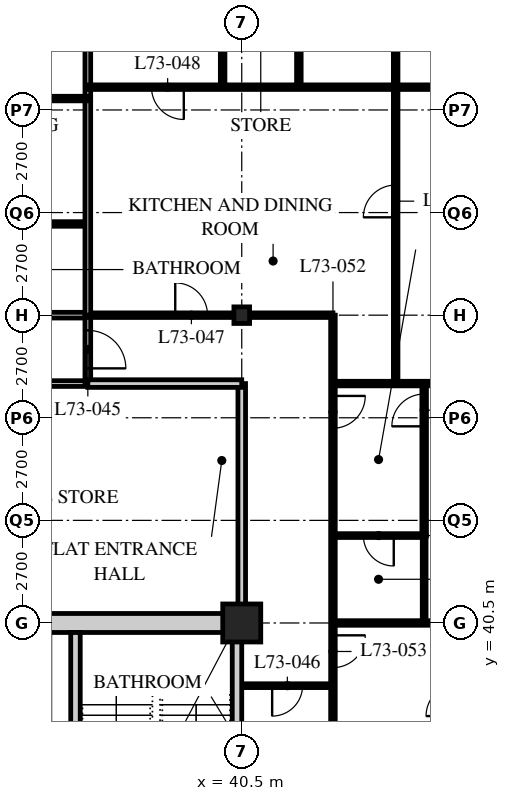
"""IFC4 building model, lengths in metres.
Left out: names, types, materials, properties, quantities, classifications, styles, units other than length and angle.
Written with IfcOpenShell. Run it as: python <this file> out.ifc"""

import sys

from ifc_helpers import new_model, si_unit, direction, frame, frame_2d, origin, origin_2d, place, context, subcontext, project, spatial, rectangle, hollow_rectangle, i_section, extrude, element, fill, save


model = new_model("IFC4")
c1 = context("Model", 3, precision=1e-05, world=origin(), true_north=direction((0.0, 1.0)))
c2 = subcontext(c1, "Body", "Model", "MODEL_VIEW")
j1 = project(units=[si_unit("LENGTHUNIT", "METRE"), si_unit("PLANEANGLEUNIT", "RADIAN")], contexts=[c1])
p1 = place(None, origin())
s1 = spatial("IfcSite", under=j1, at=p1, CompositionType="ELEMENT")
p2 = place(p1, origin())
s2 = spatial("IfcBuilding", under=s1, at=p2, CompositionType="ELEMENT")
p3 = place(p2, frame((0.0, 0.0, 285.3)))
s3 = spatial("IfcBuildingStorey", under=s2, at=p3, CompositionType="ELEMENT", Elevation=285.3)
p4 = place(p3, frame((40.5, 40.5, 0.0), z_axis=(0.0, 0.0, 1.0), x_axis=(1.0, 0.0, 0.0)))
e1 = element("IfcColumn", 1, at=p4, inside=s3, PredefinedType="COLUMN", context=c2, shape_type="SweptSolid", body=[
    extrude(hollow_rectangle(XDim=1.0, YDim=1.0, WallThickness=0.1, at=origin_2d()), origin(), (0.0, 0.0, 1.0), 3.9),
])
p5 = place(p3, frame((40.5, 48.6, 0.0), z_axis=(0.0, 0.0, 1.0), x_axis=(1.0, 0.0, 0.0)))
e2 = element("IfcColumn", 2, at=p5, inside=s3, PredefinedType="COLUMN", context=c2, shape_type="SweptSolid", body=[
    extrude(i_section(OverallWidth=0.412, OverallDepth=0.437, WebThickness=0.036, FlangeThickness=0.058, FilletRadius=0.015, at=origin_2d()), origin(), (0.0, 0.0, 1.0), 3.9),
])
p6 = place(p3, frame((12.15, 48.6, 0.0), z_axis=(0.0, 0.0, 1.0), x_axis=(1.0, 0.0, 0.0)))
e3 = element("IfcWall", 3, at=p6, inside=s3, PredefinedType="PARTITIONING", context=c2, shape_type="SweptSolid", body=[
    extrude(rectangle(XDim=24.3, YDim=0.15, at=frame_2d((12.15, 0.0))), origin(), (0.0, 0.0, 1.0), 3.078),
])
p7 = place(p6, frame((4.95, 0.0, 0.0)))
e4 = element("IfcOpeningElement", 4, at=p7, cuts=e3, PredefinedType="OPENING", context=c2, shape_type="SweptSolid", body=[
    extrude(rectangle(XDim=1.0, YDim=2.1, at=frame_2d((0.5, 1.05))), frame((0.0, 0.085, 0.0), z_axis=(0.0, -1.0, 0.0), x_axis=(1.0, 0.0, 0.0)), (0.0, 0.0, 1.0), 0.17),
])
p8 = place(p6, frame((16.6, 0.0, 0.0)))
e5 = element("IfcOpeningElement", 5, at=p8, cuts=e3, PredefinedType="OPENING", context=c2, shape_type="SweptSolid", body=[
    extrude(rectangle(XDim=1.0, YDim=2.1, at=frame_2d((0.5, 1.05))), frame((0.0, 0.085, 0.0), z_axis=(0.0, -1.0, 0.0), x_axis=(1.0, 0.0, 0.0)), (0.0, 0.0, 1.0), 0.17),
])
p9 = place(p6, frame((1.525, 0.0, 0.0)))
e6 = element("IfcOpeningElement", 6, at=p9, cuts=e3, PredefinedType="OPENING", context=c2, shape_type="SweptSolid", body=[
    extrude(rectangle(XDim=1.0, YDim=2.1, at=frame_2d((0.5, 1.05))), frame((0.0, 0.085, 0.0), z_axis=(0.0, -1.0, 0.0), x_axis=(1.0, 0.0, 0.0)), (0.0, 0.0, 1.0), 0.17),
])
p10 = place(p3, frame((29.56, 46.8, 0.0), z_axis=(0.0, 0.0, 1.0), x_axis=(1.0, 0.0, 0.0)))
e7 = element("IfcWall", 7, at=p10, inside=s3, PredefinedType="PARTITIONING", context=c2, shape_type="SweptSolid", body=[
    extrude(rectangle(XDim=6.89, YDim=0.15, at=frame_2d((3.445, 0.0))), origin(), (0.0, 0.0, 1.0), 3.69),
])
p11 = place(p10, frame((2.69, 0.0, 0.0)))
e8 = element("IfcOpeningElement", 8, at=p11, cuts=e7, PredefinedType="OPENING", context=c2, shape_type="SweptSolid", body=[
    extrude(rectangle(XDim=1.0, YDim=2.1, at=frame_2d((0.5, 1.05))), frame((0.0, 0.085, 0.0), z_axis=(0.0, -1.0, 0.0), x_axis=(1.0, 0.0, 0.0)), (0.0, 0.0, 1.0), 0.17),
])
p12 = place(p3, frame((36.45, 46.8, 0.0), z_axis=(0.0, 0.0, 1.0), x_axis=(0.0, 1.0, 0.0)))
e9 = element("IfcWall", 9, at=p12, inside=s3, PredefinedType="PARTITIONING", context=c2, shape_type="SweptSolid", body=[
    extrude(rectangle(XDim=1.8, YDim=0.15, at=frame_2d((0.9, 0.0))), origin(), (0.0, 0.0, 1.0), 3.69),
])
p13 = place(p12, frame((0.4, 0.0, 0.0)))
e10 = element("IfcOpeningElement", 10, at=p13, cuts=e9, PredefinedType="OPENING", context=c2, shape_type="SweptSolid", body=[
    extrude(rectangle(XDim=1.0, YDim=2.1, at=frame_2d((0.5, 1.05))), frame((0.0, 0.085, 0.0), z_axis=(0.0, -1.0, 0.0), x_axis=(1.0, 0.0, 0.0)), (0.0, 0.0, 1.0), 0.17),
])
p14 = place(p3, frame((40.5, 40.5, 0.0), z_axis=(0.0, 0.0, 1.0), x_axis=(0.0, 1.0, 0.0)))
e11 = element("IfcWall", 11, at=p14, inside=s3, PredefinedType="SOLIDWALL", context=c2, shape_type="SweptSolid", body=[
    extrude(rectangle(XDim=6.3, YDim=0.2, at=frame_2d((3.15, 0.0))), origin(), (0.0, 0.0, 1.0), 3.078),
])
p15 = place(p3, frame((8.15, 51.0, 0.0), z_axis=(0.0, 0.0, 1.0), x_axis=(1.0, 0.0, 0.0)))
e12 = element("IfcWall", 12, at=p15, inside=s3, PredefinedType="PARTITIONING", context=c2, shape_type="SweptSolid", body=[
    extrude(rectangle(XDim=28.3, YDim=0.12, at=frame_2d((14.15, 0.0))), origin(), (0.0, 0.0, 1.0), 3.69),
])
p16 = place(p15, frame((9.025, 0.0, 0.0)))
e13 = element("IfcOpeningElement", 13, at=p16, cuts=e12, PredefinedType="OPENING", context=c2, shape_type="SweptSolid", body=[
    extrude(rectangle(XDim=0.85, YDim=2.1, at=frame_2d((0.425, 1.05))), frame((0.0, 0.07, 0.0), z_axis=(0.0, -1.0, 0.0), x_axis=(1.0, 0.0, 0.0)), (0.0, 0.0, 1.0), 0.14),
])
p17 = place(p15, frame((16.475, 0.0, 0.0)))
e14 = element("IfcOpeningElement", 14, at=p17, cuts=e12, PredefinedType="OPENING", context=c2, shape_type="SweptSolid", body=[
    extrude(rectangle(XDim=0.85, YDim=2.1, at=frame_2d((0.425, 1.05))), frame((0.0, 0.07, 0.0), z_axis=(0.0, -1.0, 0.0), x_axis=(1.0, 0.0, 0.0)), (0.0, 0.0, 1.0), 0.14),
])
p18 = place(p15, frame((21.175, 0.0, 0.0)))
e15 = element("IfcOpeningElement", 15, at=p18, cuts=e12, PredefinedType="OPENING", context=c2, shape_type="SweptSolid", body=[
    extrude(rectangle(XDim=0.85, YDim=2.1, at=frame_2d((0.425, 1.05))), frame((0.0, 0.07, 0.0), z_axis=(0.0, -1.0, 0.0), x_axis=(1.0, 0.0, 0.0)), (0.0, 0.0, 1.0), 0.14),
])
p19 = place(p15, frame((24.575, 0.0, 0.0)))
e16 = element("IfcOpeningElement", 16, at=p19, cuts=e12, PredefinedType="OPENING", context=c2, shape_type="SweptSolid", body=[
    extrude(rectangle(XDim=0.85, YDim=2.1, at=frame_2d((0.425, 1.05))), frame((0.0, 0.07, 0.0), z_axis=(0.0, -1.0, 0.0), x_axis=(1.0, 0.0, 0.0)), (0.0, 0.0, 1.0), 0.14),
])
p20 = place(p15, frame((6.725, 0.0, 0.0)))
e17 = element("IfcOpeningElement", 17, at=p20, cuts=e12, PredefinedType="OPENING", context=c2, shape_type="SweptSolid", body=[
    extrude(rectangle(XDim=0.85, YDim=2.1, at=frame_2d((0.425, 1.05))), frame((0.0, 0.07, 0.0), z_axis=(0.0, -1.0, 0.0), x_axis=(1.0, 0.0, 0.0)), (0.0, 0.0, 1.0), 0.14),
])
p21 = place(p15, frame((2.875, 0.0, 0.0)))
e18 = element("IfcOpeningElement", 18, at=p21, cuts=e12, PredefinedType="OPENING", context=c2, shape_type="SweptSolid", body=[
    extrude(rectangle(XDim=0.85, YDim=2.1, at=frame_2d((0.425, 1.05))), frame((0.0, 0.07, 0.0), z_axis=(0.0, -1.0, 0.0), x_axis=(1.0, 0.0, 0.0)), (0.0, 0.0, 1.0), 0.14),
])
p22 = place(p3, frame((40.5, 38.85, 0.0), z_axis=(0.0, 0.0, 1.0), x_axis=(1.0, 0.0, 0.0)))
e19 = element("IfcWall", 19, at=p22, inside=s3, PredefinedType="PARTITIONING", context=c2, shape_type="SweptSolid", body=[
    extrude(rectangle(XDim=2.4, YDim=0.1, at=frame_2d((1.2, 0.0))), origin(), (0.0, 0.0, 1.0), 3.69),
])
p23 = place(p22, frame((0.8, 0.0, 0.0)))
e20 = element("IfcOpeningElement", 20, at=p23, cuts=e19, PredefinedType="OPENING", context=c2, shape_type="SweptSolid", body=[
    extrude(rectangle(XDim=0.8, YDim=2.1, at=frame_2d((0.4, 1.05))), frame((0.0, 0.06, 0.0), z_axis=(0.0, -1.0, 0.0), x_axis=(1.0, 0.0, 0.0)), (0.0, 0.0, 1.0), 0.12),
])
p24 = place(p3, frame((42.9, 48.6, 0.0), z_axis=(0.0, 0.0, 1.0), x_axis=(0.0, -1.0, 0.0)))
e21 = element("IfcWall", 21, at=p24, inside=s3, PredefinedType="PARTITIONING", context=c2, shape_type="SweptSolid", body=[
    extrude(rectangle(XDim=12.15, YDim=0.12, at=frame_2d((6.075, 0.0))), origin(), (0.0, 0.0, 1.0), 3.69),
])
p25 = place(p24, frame((2.125, 0.0, 0.0)))
e22 = element("IfcOpeningElement", 22, at=p25, cuts=e21, PredefinedType="OPENING", context=c2, shape_type="SweptSolid", body=[
    extrude(rectangle(XDim=0.85, YDim=2.1, at=frame_2d((0.425, 1.05))), frame((0.0, 0.07, 0.0), z_axis=(0.0, -1.0, 0.0), x_axis=(1.0, 0.0, 0.0)), (0.0, 0.0, 1.0), 0.14),
])
p26 = place(p24, frame((8.425, 0.0, 0.0)))
e23 = element("IfcOpeningElement", 23, at=p26, cuts=e21, PredefinedType="OPENING", context=c2, shape_type="SweptSolid", body=[
    extrude(rectangle(XDim=0.85, YDim=2.1, at=frame_2d((0.425, 1.05))), frame((0.0, 0.07, 0.0), z_axis=(0.0, -1.0, 0.0), x_axis=(1.0, 0.0, 0.0)), (0.0, 0.0, 1.0), 0.14),
])
p27 = place(p3, frame((36.45, 48.6, 0.0), z_axis=(0.0, 0.0, 1.0), x_axis=(1.0, 0.0, 0.0)))
e24 = element("IfcWall", 24, at=p27, inside=s3, PredefinedType="PARTITIONING", context=c2, shape_type="SweptSolid", body=[
    extrude(rectangle(XDim=6.45, YDim=0.12, at=frame_2d((3.225, 0.0))), origin(), (0.0, 0.0, 1.0), 3.078),
])
p28 = place(p27, frame((2.3, 0.0, 0.0)))
e25 = element("IfcOpeningElement", 25, at=p28, cuts=e24, PredefinedType="OPENING", context=c2, shape_type="SweptSolid", body=[
    extrude(rectangle(XDim=0.85, YDim=2.1, at=frame_2d((0.425, 1.05))), frame((0.0, 0.07, 0.0), z_axis=(0.0, -1.0, 0.0), x_axis=(1.0, 0.0, 0.0)), (0.0, 0.0, 1.0), 0.14),
])
p29 = place(p3, frame((36.45, 46.8, 0.0), z_axis=(0.0, 0.0, 1.0), x_axis=(1.0, 0.0, 0.0)))
e26 = element("IfcWall", 26, at=p29, inside=s3, PredefinedType="SOLIDWALL", context=c2, shape_type="SweptSolid", body=[
    extrude(rectangle(XDim=4.05, YDim=0.2, at=frame_2d((2.025, 0.0))), origin(), (0.0, 0.0, 1.0), 3.69),
])
p30 = place(p3, frame((42.9, 46.8, 0.0), z_axis=(0.0, 0.0, 1.0), x_axis=(1.0, 0.0, 0.0)))
e27 = element("IfcWall", 27, at=p30, inside=s3, PredefinedType="PARTITIONING", context=c2, shape_type="SweptSolid", body=[
    extrude(rectangle(XDim=13.5, YDim=0.12, at=frame_2d((6.75, 0.0))), origin(), (0.0, 0.0, 1.0), 3.69),
])
p31 = place(p3, frame((36.45, 64.5, 0.0), z_axis=(0.0, 0.0, 1.0), x_axis=(0.0, -1.0, 0.0)))
e28 = element("IfcWall", 28, at=p31, inside=s3, PredefinedType="PARTITIONING", context=c2, shape_type="SweptSolid", body=[
    extrude(rectangle(XDim=15.9, YDim=0.15, at=frame_2d((7.95, 0.0))), origin(), (0.0, 0.0, 1.0), 3.69),
])
p32 = place(p3, frame((36.45, 54.6, 0.0), z_axis=(0.0, 0.0, 1.0), x_axis=(1.0, 0.0, 0.0)))
e29 = element("IfcWall", 29, at=p32, inside=s3, PredefinedType="PARTITIONING", context=c2, shape_type="SweptSolid", body=[
    extrude(rectangle(XDim=19.95, YDim=0.12, at=frame_2d((9.975, 0.0))), origin(), (0.0, 0.0, 1.0), 3.69),
])
p33 = place(p32, frame((1.675, 0.0, 0.0)))
e30 = element("IfcOpeningElement", 30, at=p33, cuts=e29, PredefinedType="OPENING", context=c2, shape_type="SweptSolid", body=[
    extrude(rectangle(XDim=0.85, YDim=2.1, at=frame_2d((0.425, 1.05))), frame((0.0, 0.07, 0.0), z_axis=(0.0, -1.0, 0.0), x_axis=(1.0, 0.0, 0.0)), (0.0, 0.0, 1.0), 0.14),
])
p34 = place(p3, frame((44.55, 64.5, 0.0), z_axis=(0.0, 0.0, 1.0), x_axis=(0.0, -1.0, 0.0)))
e31 = element("IfcWall", 31, at=p34, inside=s3, PredefinedType="PARTITIONING", context=c2, shape_type="SweptSolid", body=[
    extrude(rectangle(XDim=17.7, YDim=0.12, at=frame_2d((8.85, 0.0))), origin(), (0.0, 0.0, 1.0), 3.69),
])
p35 = place(p34, frame((12.475, 0.0, 0.0)))
e32 = element("IfcOpeningElement", 32, at=p35, cuts=e31, PredefinedType="OPENING", context=c2, shape_type="SweptSolid", body=[
    extrude(rectangle(XDim=0.85, YDim=2.1, at=frame_2d((0.425, 1.05))), frame((0.0, 0.07, 0.0), z_axis=(0.0, -1.0, 0.0), x_axis=(1.0, 0.0, 0.0)), (0.0, 0.0, 1.0), 0.14),
])
p36 = place(p34, frame((4.525, 0.0, 0.0)))
e33 = element("IfcOpeningElement", 33, at=p36, cuts=e31, PredefinedType="OPENING", context=c2, shape_type="SweptSolid", body=[
    extrude(rectangle(XDim=0.85, YDim=2.1, at=frame_2d((0.425, 1.05))), frame((0.0, 0.07, 0.0), z_axis=(0.0, -1.0, 0.0), x_axis=(1.0, 0.0, 0.0)), (0.0, 0.0, 1.0), 0.14),
])
p37 = place(p3, frame((42.9, 42.8, 0.0), z_axis=(0.0, 0.0, 1.0), x_axis=(1.0, 0.0, 0.0)))
e34 = element("IfcWall", 34, at=p37, inside=s3, PredefinedType="PARTITIONING", context=c2, shape_type="SweptSolid", body=[
    extrude(rectangle(XDim=2.4, YDim=0.1, at=frame_2d((1.2, 0.0))), origin(), (0.0, 0.0, 1.0), 3.69),
])
p38 = place(p37, frame((0.8, 0.0, 0.0)))
e35 = element("IfcOpeningElement", 35, at=p38, cuts=e34, PredefinedType="OPENING", context=c2, shape_type="SweptSolid", body=[
    extrude(rectangle(XDim=0.8, YDim=2.1, at=frame_2d((0.4, 1.05))), frame((0.0, 0.06, 0.0), z_axis=(0.0, -1.0, 0.0), x_axis=(1.0, 0.0, 0.0)), (0.0, 0.0, 1.0), 0.12),
])
p39 = place(p3, frame((45.3, 42.8, 0.0), z_axis=(0.0, 0.0, 1.0), x_axis=(0.0, -1.0, 0.0)))
e36 = element("IfcWall", 36, at=p39, inside=s3, PredefinedType="PARTITIONING", context=c2, shape_type="SweptSolid", body=[
    extrude(rectangle(XDim=2.3, YDim=0.1, at=frame_2d((1.15, 0.0))), origin(), (0.0, 0.0, 1.0), 3.69),
])
p40 = place(p3, frame((42.9, 40.5, 0.0), z_axis=(0.0, 0.0, 1.0), x_axis=(1.0, 0.0, 0.0)))
e37 = element("IfcWall", 37, at=p40, inside=s3, PredefinedType="PARTITIONING", context=c2, shape_type="SweptSolid", body=[
    extrude(rectangle(XDim=13.5, YDim=0.12, at=frame_2d((6.75, 0.0))), origin(), (0.0, 0.0, 1.0), 3.078),
])
p41 = place(p3, frame((45.3, 46.8, 0.0), z_axis=(0.0, 0.0, 1.0), x_axis=(0.0, -1.0, 0.0)))
e38 = element("IfcWall", 38, at=p41, inside=s3, PredefinedType="PARTITIONING", context=c2, shape_type="SweptSolid", body=[
    extrude(rectangle(XDim=4.01, YDim=0.12, at=frame_2d((2.005, 0.0))), origin(), (0.0, 0.0, 1.0), 3.69),
])
p42 = place(p41, frame((0.275, 0.0, 0.0)))
e39 = element("IfcOpeningElement", 39, at=p42, cuts=e38, PredefinedType="OPENING", context=c2, shape_type="SweptSolid", body=[
    extrude(rectangle(XDim=0.85, YDim=2.1, at=frame_2d((0.425, 1.05))), frame((0.0, 0.07, 0.0), z_axis=(0.0, -1.0, 0.0), x_axis=(1.0, 0.0, 0.0)), (0.0, 0.0, 1.0), 0.14),
])
p43 = place(p3, frame((32.4, 54.3, 0.0), z_axis=(0.0, 0.0, 1.0), x_axis=(1.0, 0.0, 0.0)))
e40 = element("IfcWall", 40, at=p43, inside=s3, PredefinedType="PARTITIONING", context=c2, shape_type="SweptSolid", body=[
    extrude(rectangle(XDim=4.05, YDim=0.12, at=frame_2d((2.025, 0.0))), origin(), (0.0, 0.0, 1.0), 3.69),
])
p44 = place(p43, frame((1.6, 0.0, 0.0)))
e41 = element("IfcOpeningElement", 41, at=p44, cuts=e40, PredefinedType="OPENING", context=c2, shape_type="SweptSolid", body=[
    extrude(rectangle(XDim=0.85, YDim=2.1, at=frame_2d((0.425, 1.05))), frame((0.0, 0.07, 0.0), z_axis=(0.0, -1.0, 0.0), x_axis=(1.0, 0.0, 0.0)), (0.0, 0.0, 1.0), 0.14),
])
for number, where, z_axis, x_axis in (
    (42, (39.997, 54.6, 0.0), (0.0, 0.0, 1.0), (0.0, 1.0, 0.0)),
    (43, (42.003, 54.6, 0.0), (0.0, 0.0, 1.0), (0.0, 1.0, 0.0)),
):
    element("IfcWall", number, at=place(p3, frame(where, z_axis=z_axis, x_axis=x_axis)), inside=s3, PredefinedType="PARTITIONING", context=c2, shape_type="SweptSolid", body=[
        extrude(rectangle(XDim=2.363, YDim=0.12, at=frame_2d((1.181, 0.0))), origin(), (0.0, 0.0, 1.0), 3.69),
    ])
p45 = place(p3, frame((15.95, 40.5, 0.0), z_axis=(0.0, 0.0, 1.0), x_axis=(1.0, 0.0, 0.0)))
e44 = element("IfcWall", 44, at=p45, inside=s3, PredefinedType="SOLIDWALL", context=c2, shape_type="SweptSolid", body=[
    extrude(rectangle(XDim=24.55, YDim=0.5, at=frame_2d((12.275, 0.0))), origin(), (0.0, 0.0, 1.0), 3.04),
])
p46 = place(p45, frame((11.5, 0.0, 0.0)))
e45 = element("IfcOpeningElement", 45, at=p46, cuts=e44, PredefinedType="OPENING", context=c2, shape_type="SweptSolid", body=[
    extrude(rectangle(XDim=1.8, YDim=2.4, at=frame_2d((0.9, 1.2))), frame((0.0, 0.26, 0.0), z_axis=(0.0, -1.0, 0.0), x_axis=(1.0, 0.0, 0.0)), (0.0, 0.0, 1.0), 0.52),
])
p47 = place(p3, frame((40.375, 24.55, 0.0), z_axis=(0.0, 0.0, 1.0), x_axis=(0.0, 1.0, 0.0)))
e46 = element("IfcWall", 46, at=p47, inside=s3, PredefinedType="SOLIDWALL", context=c2, shape_type="SweptSolid", body=[
    extrude(rectangle(XDim=15.7, YDim=0.25, at=frame_2d((7.85, 0.0))), origin(), (0.0, 0.0, 1.0), 3.078),
])
p48 = place(p3, frame((36.125, 32.5, 0.0), z_axis=(0.0, 0.0, 1.0), x_axis=(0.0, 1.0, 0.0)))
e47 = element("IfcWall", 47, at=p48, inside=s3, PredefinedType="SOLIDWALL", context=c2, shape_type="SweptSolid", body=[
    extrude(rectangle(XDim=7.75, YDim=0.25, at=frame_2d((3.875, 0.0))), origin(), (0.0, 0.0, 1.0), 3.69),
])
p49 = place(p48, frame((0.45, 0.0, 0.0)))
e48 = element("IfcOpeningElement", 48, at=p49, cuts=e47, PredefinedType="OPENING", context=c2, shape_type="SweptSolid", body=[
    extrude(rectangle(XDim=1.2, YDim=2.1, at=frame_2d((0.6, 1.05))), frame((0.0, 0.135, 0.0), z_axis=(0.0, -1.0, 0.0), x_axis=(1.0, 0.0, 0.0)), (0.0, 0.0, 1.0), 0.27),
])
p50 = place(p13, origin())
e49 = element("IfcDoor", 49, at=p50, inside=s3, OperationType="SINGLE_SWING_RIGHT", PredefinedType="DOOR", context=c2, shape_type="SweptSolid", body=[
    extrude(rectangle(XDim=1.0, YDim=2.1, at=frame_2d((0.5, 1.05))), frame((0.0, 0.025, 0.0), z_axis=(0.0, -1.0, 0.0), x_axis=(1.0, 0.0, 0.0)), (0.0, 0.0, 1.0), 0.05),
])
fill(e10, e49)
p51 = place(p23, origin())
e50 = element("IfcDoor", 50, at=p51, inside=s3, OperationType="SINGLE_SWING_RIGHT", PredefinedType="DOOR", context=c2, shape_type="SweptSolid", body=[
    extrude(rectangle(XDim=0.8, YDim=2.1, at=frame_2d((0.4, 1.05))), frame((0.0, 0.025, 0.0), z_axis=(0.0, -1.0, 0.0), x_axis=(1.0, 0.0, 0.0)), (0.0, 0.0, 1.0), 0.05),
])
fill(e20, e50)
p52 = place(p28, origin())
e51 = element("IfcDoor", 51, at=p52, inside=s3, OperationType="SINGLE_SWING_LEFT", PredefinedType="DOOR", context=c2, shape_type="SweptSolid", body=[
    extrude(rectangle(XDim=0.85, YDim=2.1, at=frame_2d((0.425, 1.05))), frame((0.0, 0.025, 0.0), z_axis=(0.0, -1.0, 0.0), x_axis=(1.0, 0.0, 0.0)), (0.0, 0.0, 1.0), 0.05),
])
fill(e25, e51)
p53 = place(p33, origin())
e52 = element("IfcDoor", 52, at=p53, inside=s3, OperationType="SINGLE_SWING_LEFT", PredefinedType="DOOR", context=c2, shape_type="SweptSolid", body=[
    extrude(rectangle(XDim=0.85, YDim=2.1, at=frame_2d((0.425, 1.05))), frame((0.0, 0.025, 0.0), z_axis=(0.0, -1.0, 0.0), x_axis=(1.0, 0.0, 0.0)), (0.0, 0.0, 1.0), 0.05),
])
fill(e30, e52)
p54 = place(p35, origin())
e53 = element("IfcDoor", 53, at=p54, inside=s3, OperationType="SINGLE_SWING_LEFT", PredefinedType="DOOR", context=c2, shape_type="SweptSolid", body=[
    extrude(rectangle(XDim=0.85, YDim=2.1, at=frame_2d((0.425, 1.05))), frame((0.0, 0.025, 0.0), z_axis=(0.0, -1.0, 0.0), x_axis=(1.0, 0.0, 0.0)), (0.0, 0.0, 1.0), 0.05),
])
fill(e32, e53)
p55 = place(p38, origin())
e54 = element("IfcDoor", 54, at=p55, inside=s3, OperationType="SINGLE_SWING_LEFT", PredefinedType="DOOR", context=c2, shape_type="SweptSolid", body=[
    extrude(rectangle(XDim=0.8, YDim=2.1, at=frame_2d((0.4, 1.05))), frame((0.0, 0.025, 0.0), z_axis=(0.0, -1.0, 0.0), x_axis=(1.0, 0.0, 0.0)), (0.0, 0.0, 1.0), 0.05),
])
fill(e35, e54)
p56 = place(p25, origin())
e55 = element("IfcDoor", 55, at=p56, inside=s3, OperationType="SINGLE_SWING_LEFT", PredefinedType="DOOR", context=c2, shape_type="SweptSolid", body=[
    extrude(rectangle(XDim=0.85, YDim=2.1, at=frame_2d((0.425, 1.05))), frame((0.0, 0.025, 0.0), z_axis=(0.0, -1.0, 0.0), x_axis=(1.0, 0.0, 0.0)), (0.0, 0.0, 1.0), 0.05),
])
fill(e22, e55)
p57 = place(p26, origin())
e56 = element("IfcDoor", 56, at=p57, inside=s3, OperationType="SINGLE_SWING_LEFT", PredefinedType="DOOR", context=c2, shape_type="SweptSolid", body=[
    extrude(rectangle(XDim=0.85, YDim=2.1, at=frame_2d((0.425, 1.05))), frame((0.0, 0.025, 0.0), z_axis=(0.0, -1.0, 0.0), x_axis=(1.0, 0.0, 0.0)), (0.0, 0.0, 1.0), 0.05),
])
fill(e23, e56)
p58 = place(p42, origin())
e57 = element("IfcDoor", 57, at=p58, inside=s3, OperationType="SINGLE_SWING_LEFT", PredefinedType="DOOR", context=c2, shape_type="SweptSolid", body=[
    extrude(rectangle(XDim=0.85, YDim=2.1, at=frame_2d((0.425, 1.05))), frame((0.0, 0.025, 0.0), z_axis=(0.0, -1.0, 0.0), x_axis=(1.0, 0.0, 0.0)), (0.0, 0.0, 1.0), 0.05),
])
fill(e39, e57)
save(model, sys.argv[1])
